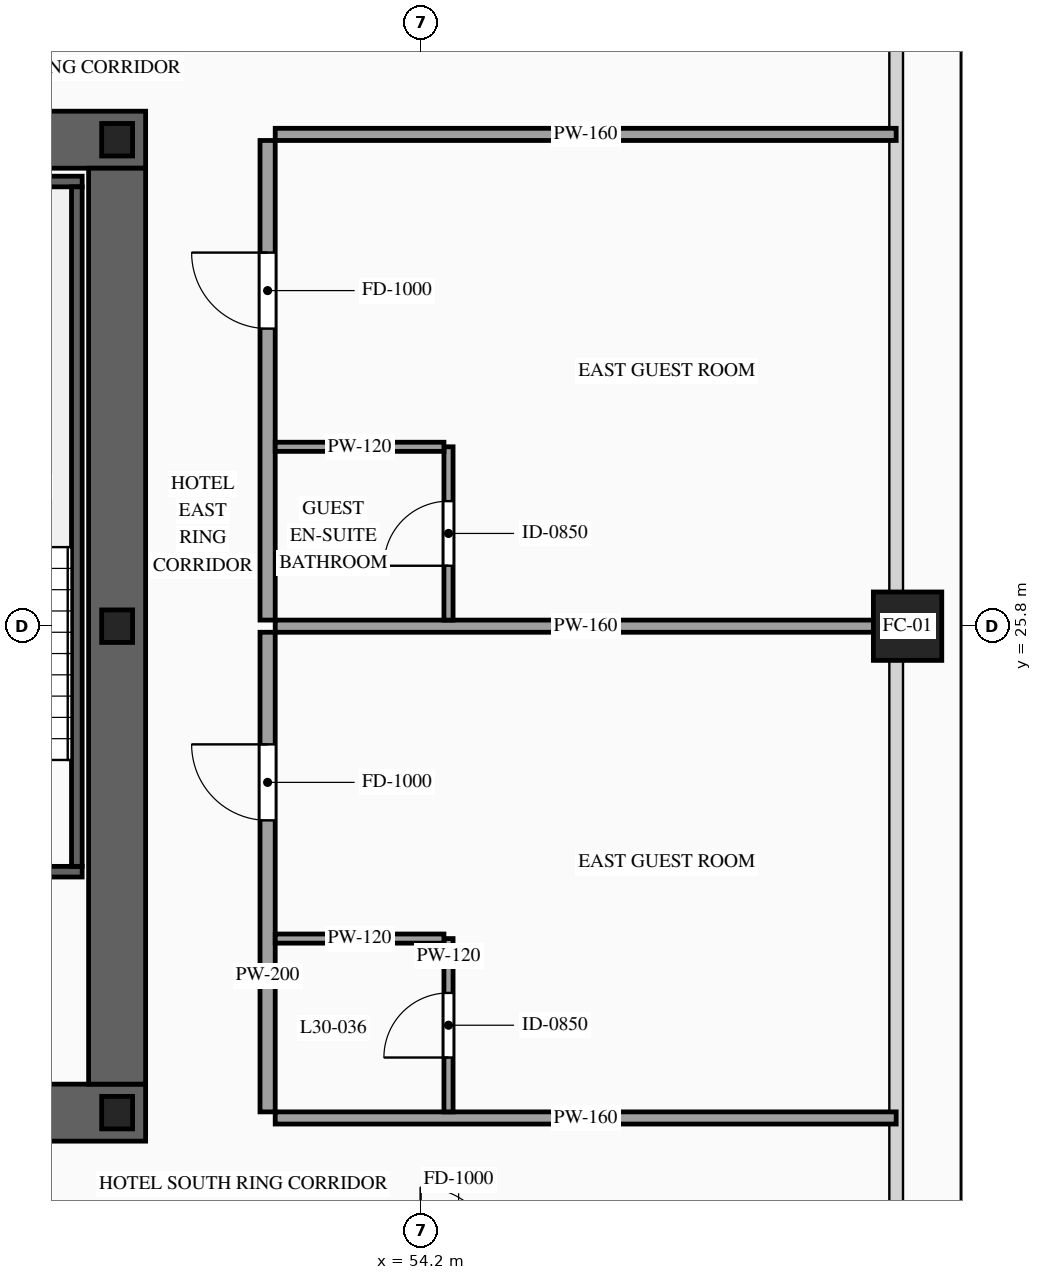
"""IFC4 building model, lengths in metres.
Left out: names, types, materials, properties, quantities, classifications, styles, units other than length and angle.
Written with IfcOpenShell. Run it as: python <this file> out.ifc"""

import sys

from ifc_helpers import new_model, si_unit, direction, frame, frame_2d, origin, origin_2d, place, context, subcontext, project, spatial, rectangle, hollow_rectangle, i_section, extrude, source, transform, mapped, element, fill, save


model = new_model("IFC4")
c1 = context("Model", 3, precision=1e-05, world=origin(), true_north=direction((0.0, 1.0)))
c2 = subcontext(c1, "Body", "Model", "MODEL_VIEW")
j1 = project(units=[si_unit("LENGTHUNIT", "METRE"), si_unit("PLANEANGLEUNIT", "RADIAN")], contexts=[c1])
p1 = place(None, origin())
s1 = spatial("IfcSite", under=j1, at=p1, CompositionType="ELEMENT")
p2 = place(p1, origin())
s2 = spatial("IfcBuilding", under=s1, at=p2, CompositionType="ELEMENT")
p3 = place(p2, frame((0.0, 0.0, 115.4)))
s3 = spatial("IfcBuildingStorey", under=s2, at=p3, CompositionType="ELEMENT", Elevation=115.4)
p4 = place(p3, frame((23.425, 19.4, 0.0), z_axis=(0.0, 0.0, 1.0), x_axis=(1.0, 0.0, 0.0)))
e1 = element("IfcWall", 1, at=p4, inside=s3, PredefinedType="SHEAR", context=c2, shape_type="SweptSolid", body=[
    extrude(rectangle(XDim=27.15, YDim=0.75, at=frame_2d((13.575, 0.0))), origin(), (0.0, 0.0, 1.0), 3.6),
])
p5 = place(p4, frame((2.025, 0.0, 0.0)))
e2 = element("IfcOpeningElement", 2, at=p5, cuts=e1, PredefinedType="OPENING", context=c2, shape_type="SweptSolid", body=[
    extrude(rectangle(XDim=1.1, YDim=2.2, at=frame_2d((0.55, 1.1))), frame((0.0, 0.39, 0.0), z_axis=(0.0, -1.0, 0.0), x_axis=(1.0, 0.0, 0.0)), (0.0, 0.0, 1.0), 0.78),
])
p6 = place(p4, frame((9.925, 0.0, 0.0)))
e3 = element("IfcOpeningElement", 3, at=p6, cuts=e1, PredefinedType="OPENING", context=c2, shape_type="SweptSolid", body=[
    extrude(rectangle(XDim=1.1, YDim=2.2, at=frame_2d((0.55, 1.1))), frame((0.0, 0.39, 0.0), z_axis=(0.0, -1.0, 0.0), x_axis=(1.0, 0.0, 0.0)), (0.0, 0.0, 1.0), 0.78),
])
p7 = place(p4, frame((23.125, 0.0, 0.0)))
e4 = element("IfcOpeningElement", 4, at=p7, cuts=e1, PredefinedType="OPENING", context=c2, shape_type="SweptSolid", body=[
    extrude(rectangle(XDim=1.1, YDim=2.2, at=frame_2d((0.55, 1.1))), frame((0.0, 0.39, 0.0), z_axis=(0.0, -1.0, 0.0), x_axis=(1.0, 0.0, 0.0)), (0.0, 0.0, 1.0), 0.78),
])
p8 = place(p4, frame((19.745, 0.0, 0.0)))
e5 = element("IfcOpeningElement", 5, at=p8, cuts=e1, PredefinedType="OPENING", context=c2, shape_type="SweptSolid", body=[
    extrude(rectangle(XDim=0.9, YDim=2.15, at=frame_2d((0.45, 1.075))), frame((0.0, 0.39, 0.0), z_axis=(0.0, -1.0, 0.0), x_axis=(1.0, 0.0, 0.0)), (0.0, 0.0, 1.0), 0.78),
])
p9 = place(p4, frame((18.305, 0.0, 0.0)))
e6 = element("IfcOpeningElement", 6, at=p9, cuts=e1, PredefinedType="OPENING", context=c2, shape_type="SweptSolid", body=[
    extrude(rectangle(XDim=0.9, YDim=2.15, at=frame_2d((0.45, 1.075))), frame((0.0, 0.39, 0.0), z_axis=(0.0, -1.0, 0.0), x_axis=(1.0, 0.0, 0.0)), (0.0, 0.0, 1.0), 0.78),
])
p10 = place(p3, frame((23.425, 32.2, 0.0), z_axis=(0.0, 0.0, 1.0), x_axis=(1.0, 0.0, 0.0)))
e7 = element("IfcWall", 7, at=p10, inside=s3, PredefinedType="SHEAR", context=c2, shape_type="SweptSolid", body=[
    extrude(rectangle(XDim=27.15, YDim=0.75, at=frame_2d((13.575, 0.0))), origin(), (0.0, 0.0, 1.0), 3.6),
])
p11 = place(p10, frame((4.645, 0.0, 0.0)))
e8 = element("IfcOpeningElement", 8, at=p11, cuts=e7, PredefinedType="OPENING", context=c2, shape_type="SweptSolid", body=[
    extrude(rectangle(XDim=0.9, YDim=2.15, at=frame_2d((0.45, 1.075))), frame((0.0, 0.39, 0.0), z_axis=(0.0, -1.0, 0.0), x_axis=(1.0, 0.0, 0.0)), (0.0, 0.0, 1.0), 0.78),
])
p12 = place(p10, frame((9.925, 0.0, 0.0)))
e9 = element("IfcOpeningElement", 9, at=p12, cuts=e7, PredefinedType="OPENING", context=c2, shape_type="SweptSolid", body=[
    extrude(rectangle(XDim=1.1, YDim=2.2, at=frame_2d((0.55, 1.1))), frame((0.0, 0.39, 0.0), z_axis=(0.0, -1.0, 0.0), x_axis=(1.0, 0.0, 0.0)), (0.0, 0.0, 1.0), 0.78),
])
p13 = place(p10, frame((15.775, 0.0, 0.0)))
e10 = element("IfcOpeningElement", 10, at=p13, cuts=e7, PredefinedType="OPENING", context=c2, shape_type="SweptSolid", body=[
    extrude(rectangle(XDim=1.1, YDim=2.2, at=frame_2d((0.55, 1.1))), frame((0.0, 0.39, 0.0), z_axis=(0.0, -1.0, 0.0), x_axis=(1.0, 0.0, 0.0)), (0.0, 0.0, 1.0), 0.78),
])
p14 = place(p10, frame((18.305, 0.0, 0.0)))
e11 = element("IfcOpeningElement", 11, at=p14, cuts=e7, PredefinedType="OPENING", context=c2, shape_type="SweptSolid", body=[
    extrude(rectangle(XDim=0.9, YDim=2.15, at=frame_2d((0.45, 1.075))), frame((0.0, 0.39, 0.0), z_axis=(0.0, -1.0, 0.0), x_axis=(1.0, 0.0, 0.0)), (0.0, 0.0, 1.0), 0.78),
])
p15 = place(p10, frame((19.745, 0.0, 0.0)))
e12 = element("IfcOpeningElement", 12, at=p15, cuts=e7, PredefinedType="OPENING", context=c2, shape_type="SweptSolid", body=[
    extrude(rectangle(XDim=0.9, YDim=2.15, at=frame_2d((0.45, 1.075))), frame((0.0, 0.39, 0.0), z_axis=(0.0, -1.0, 0.0), x_axis=(1.0, 0.0, 0.0)), (0.0, 0.0, 1.0), 0.78),
])
m1 = source(origin(), c2, "Body", "SweptSolid", [
    extrude(rectangle(XDim=12.05, YDim=0.75, at=frame_2d((6.025, 0.0))), origin(), (0.0, 0.0, 1.0), 3.6),
])
p16 = place(p3, frame((50.2, 19.775, 0.0), z_axis=(0.0, 0.0, 1.0), x_axis=(0.0, 1.0, 0.0)))
e13 = element("IfcWall", 13, at=p16, inside=s3, PredefinedType="SHEAR", context=c2, shape_type="MappedRepresentation", body=[
    mapped(m1, transform((0.0, 0.0, 0.0), scale=1.0)),
])
m2 = source(origin(), c2, "Body", "SweptSolid", [
    extrude(i_section(OverallWidth=0.407, OverallDepth=0.428, WebThickness=0.02, FlangeThickness=0.035, at=origin_2d()), origin(), (0.0, 0.0, 1.0), 3.6),
])
for number, where, z_axis, x_axis in (
    (14, (50.2, 19.4, 0.0), (0.0, 0.0, 1.0), (1.0, 0.0, 0.0)),
    (15, (50.2, 25.8, 0.0), (0.0, 0.0, 1.0), (1.0, 0.0, 0.0)),
    (16, (50.2, 32.2, 0.0), (0.0, 0.0, 1.0), (1.0, 0.0, 0.0)),
):
    element("IfcColumn", number, at=place(p3, frame(where, z_axis=z_axis, x_axis=x_axis)), inside=s3, PredefinedType="COLUMN", context=c2, shape_type="MappedRepresentation", body=[
        mapped(m2, transform((0.0, 0.0, 0.0), scale=1.0)),
    ])
m3 = source(origin(), c2, "Body", "SweptSolid", [
    extrude(hollow_rectangle(XDim=0.9, YDim=0.9, WallThickness=0.042, at=origin_2d()), origin(), (0.0, 0.0, 1.0), 3.6),
])
p17 = place(p3, frame((60.6, 25.8, 0.0), z_axis=(0.0, 0.0, 1.0), x_axis=(1.0, 0.0, 0.0)))
e17 = element("IfcColumn", 17, at=p17, inside=s3, PredefinedType="COLUMN", context=c2, shape_type="MappedRepresentation", body=[
    mapped(m3, transform((0.0, 0.0, 0.0), scale=1.0)),
])
p18 = place(p3, frame((46.46, 22.57, 0.0), z_axis=(0.0, 0.0, 1.0), x_axis=(1.0, 0.0, 0.0)))
e18 = element("IfcWall", 18, at=p18, inside=s3, PredefinedType="SOLIDWALL", context=c2, shape_type="SweptSolid", body=[
    extrude(rectangle(XDim=3.28, YDim=0.14, at=frame_2d((1.64, 0.0))), origin(), (0.0, 0.0, 1.0), 3.38),
])
p19 = place(p18, frame((1.09, 0.0, 0.0)))
e19 = element("IfcOpeningElement", 19, at=p19, cuts=e18, PredefinedType="OPENING", context=c2, shape_type="SweptSolid", body=[
    extrude(rectangle(XDim=1.1, YDim=2.2, at=frame_2d((0.55, 1.1))), frame((0.0, 0.085, 0.0), z_axis=(0.0, -1.0, 0.0), x_axis=(1.0, 0.0, 0.0)), (0.0, 0.0, 1.0), 0.17),
])
m4 = source(origin(), c2, "Body", "SweptSolid", [
    extrude(rectangle(XDim=3.28, YDim=0.14, at=frame_2d((1.64, 0.0))), origin(), (0.0, 0.0, 1.0), 3.38),
])
p20 = place(p3, frame((46.46, 31.65, 0.0), z_axis=(0.0, 0.0, 1.0), x_axis=(1.0, 0.0, 0.0)))
e20 = element("IfcWall", 20, at=p20, inside=s3, PredefinedType="SOLIDWALL", context=c2, shape_type="MappedRepresentation", body=[
    mapped(m4, transform((0.0, 0.0, 0.0), scale=1.0)),
])
m5 = source(origin(), c2, "Body", "SweptSolid", [
    extrude(rectangle(XDim=8.94, YDim=0.14, at=frame_2d((4.47, 0.0))), origin(), (0.0, 0.0, 1.0), 3.38),
])
p21 = place(p3, frame((49.67, 22.64, 0.0), z_axis=(0.0, 0.0, 1.0), x_axis=(0.0, 1.0, 0.0)))
e21 = element("IfcWall", 21, at=p21, inside=s3, PredefinedType="SOLIDWALL", context=c2, shape_type="MappedRepresentation", body=[
    mapped(m5, transform((0.0, 0.0, 0.0), scale=1.0)),
])
p22 = place(p3, frame((52.18, 19.41, 0.0), z_axis=(0.0, 0.0, 1.0), x_axis=(0.0, 1.0, 0.0)))
e22 = element("IfcWall", 22, at=p22, inside=s3, PredefinedType="PARTITIONING", context=c2, shape_type="SweptSolid", body=[
    extrude(rectangle(XDim=6.31, YDim=0.2, at=frame_2d((3.155, 0.0))), origin(), (0.0, 0.0, 1.0), 3.38),
])
p23 = place(p22, frame((3.835, 0.0, 0.0)))
e23 = element("IfcOpeningElement", 23, at=p23, cuts=e22, PredefinedType="OPENING", context=c2, shape_type="SweptSolid", body=[
    extrude(rectangle(XDim=1.0, YDim=2.2, at=frame_2d((0.5, 1.1))), frame((0.0, 0.115, 0.0), z_axis=(0.0, -1.0, 0.0), x_axis=(1.0, 0.0, 0.0)), (0.0, 0.0, 1.0), 0.23),
])
m6 = source(origin(), c2, "Body", "SweptSolid", [
    extrude(rectangle(XDim=8.17, YDim=0.16, at=frame_2d((4.085, 0.0))), origin(), (0.0, 0.0, 1.0), 2.675),
])
p24 = place(p3, frame((52.28, 25.8, 0.0), z_axis=(0.0, 0.0, 1.0), x_axis=(1.0, 0.0, 0.0)))
e24 = element("IfcWall", 24, at=p24, inside=s3, PredefinedType="PARTITIONING", context=c2, shape_type="MappedRepresentation", body=[
    mapped(m6, transform((0.0, 0.0, 0.0), scale=1.0)),
])
m7 = source(origin(), c2, "Body", "SweptSolid", [
    extrude(rectangle(XDim=8.17, YDim=0.16, at=frame_2d((4.085, 0.0))), origin(), (0.0, 0.0, 1.0), 2.875),
])
p25 = place(p3, frame((52.28, 19.33, 0.0), z_axis=(0.0, 0.0, 1.0), x_axis=(1.0, 0.0, 0.0)))
e25 = element("IfcWall", 25, at=p25, inside=s3, PredefinedType="PARTITIONING", context=c2, shape_type="MappedRepresentation", body=[
    mapped(m7, transform((0.0, 0.0, 0.0), scale=1.0)),
])
p26 = place(p3, frame((54.56, 19.41, 0.0), z_axis=(0.0, 0.0, 1.0), x_axis=(0.0, 1.0, 0.0)))
e26 = element("IfcWall", 26, at=p26, inside=s3, PredefinedType="PARTITIONING", context=c2, shape_type="SweptSolid", body=[
    extrude(rectangle(XDim=2.28, YDim=0.12, at=frame_2d((1.14, 0.0))), origin(), (0.0, 0.0, 1.0), 3.38),
])
p27 = place(p26, frame((0.715, 0.0, 0.0)))
e27 = element("IfcOpeningElement", 27, at=p27, cuts=e26, PredefinedType="OPENING", context=c2, shape_type="SweptSolid", body=[
    extrude(rectangle(XDim=0.85, YDim=2.1, at=frame_2d((0.425, 1.05))), frame((0.0, 0.075, 0.0), z_axis=(0.0, -1.0, 0.0), x_axis=(1.0, 0.0, 0.0)), (0.0, 0.0, 1.0), 0.15),
])
m8 = source(origin(), c2, "Body", "SweptSolid", [
    extrude(rectangle(XDim=2.22, YDim=0.12, at=frame_2d((1.11, 0.0))), origin(), (0.0, 0.0, 1.0), 3.38),
])
p28 = place(p3, frame((52.28, 21.69, 0.0), z_axis=(0.0, 0.0, 1.0), x_axis=(1.0, 0.0, 0.0)))
e28 = element("IfcWall", 28, at=p28, inside=s3, PredefinedType="PARTITIONING", context=c2, shape_type="MappedRepresentation", body=[
    mapped(m8, transform((0.0, 0.0, 0.0), scale=1.0)),
])
p29 = place(p3, frame((52.18, 25.88, 0.0), z_axis=(0.0, 0.0, 1.0), x_axis=(0.0, 1.0, 0.0)))
e29 = element("IfcWall", 29, at=p29, inside=s3, PredefinedType="PARTITIONING", context=c2, shape_type="SweptSolid", body=[
    extrude(rectangle(XDim=6.31, YDim=0.2, at=frame_2d((3.155, 0.0))), origin(), (0.0, 0.0, 1.0), 3.38),
])
p30 = place(p29, frame((3.835, 0.0, 0.0)))
e30 = element("IfcOpeningElement", 30, at=p30, cuts=e29, PredefinedType="OPENING", context=c2, shape_type="SweptSolid", body=[
    extrude(rectangle(XDim=1.0, YDim=2.2, at=frame_2d((0.5, 1.1))), frame((0.0, 0.115, 0.0), z_axis=(0.0, -1.0, 0.0), x_axis=(1.0, 0.0, 0.0)), (0.0, 0.0, 1.0), 0.23),
])
p31 = place(p3, frame((52.28, 32.27, 0.0), z_axis=(0.0, 0.0, 1.0), x_axis=(1.0, 0.0, 0.0)))
e31 = element("IfcWall", 31, at=p31, inside=s3, PredefinedType="PARTITIONING", context=c2, shape_type="MappedRepresentation", body=[
    mapped(m7, transform((0.0, 0.0, 0.0), scale=1.0)),
])
p32 = place(p3, frame((54.56, 25.88, 0.0), z_axis=(0.0, 0.0, 1.0), x_axis=(0.0, 1.0, 0.0)))
e32 = element("IfcWall", 32, at=p32, inside=s3, PredefinedType="PARTITIONING", context=c2, shape_type="SweptSolid", body=[
    extrude(rectangle(XDim=2.28, YDim=0.12, at=frame_2d((1.14, 0.0))), origin(), (0.0, 0.0, 1.0), 3.38),
])
p33 = place(p32, frame((0.715, 0.0, 0.0)))
e33 = element("IfcOpeningElement", 33, at=p33, cuts=e32, PredefinedType="OPENING", context=c2, shape_type="SweptSolid", body=[
    extrude(rectangle(XDim=0.85, YDim=2.1, at=frame_2d((0.425, 1.05))), frame((0.0, 0.075, 0.0), z_axis=(0.0, -1.0, 0.0), x_axis=(1.0, 0.0, 0.0)), (0.0, 0.0, 1.0), 0.15),
])
p34 = place(p3, frame((52.28, 28.16, 0.0), z_axis=(0.0, 0.0, 1.0), x_axis=(1.0, 0.0, 0.0)))
e34 = element("IfcWall", 34, at=p34, inside=s3, PredefinedType="PARTITIONING", context=c2, shape_type="MappedRepresentation", body=[
    mapped(m8, transform((0.0, 0.0, 0.0), scale=1.0)),
])
m9 = source(origin(), c2, "Body", "SweptSolid", [
    extrude(rectangle(XDim=1.0, YDim=2.2, at=frame_2d((0.5, 1.1))), frame((0.0, 0.025, 0.0), z_axis=(0.0, -1.0, 0.0), x_axis=(1.0, 0.0, 0.0)), (0.0, 0.0, 1.0), 0.05),
])
p35 = place(p23, origin())
e35 = element("IfcDoor", 35, at=p35, inside=s3, OperationType="SINGLE_SWING_RIGHT", PredefinedType="DOOR", context=c2, shape_type="MappedRepresentation", body=[
    mapped(m9, transform((0.0, 0.0, 0.0), scale=1.0)),
])
fill(e23, e35)
m10 = source(origin(), c2, "Body", "SweptSolid", [
    extrude(rectangle(XDim=0.85, YDim=2.1, at=frame_2d((0.425, 1.05))), frame((0.0, 0.025, 0.0), z_axis=(0.0, -1.0, 0.0), x_axis=(1.0, 0.0, 0.0)), (0.0, 0.0, 1.0), 0.05),
])
p36 = place(p27, origin())
e36 = element("IfcDoor", 36, at=p36, inside=s3, OperationType="SINGLE_SWING_LEFT", PredefinedType="DOOR", context=c2, shape_type="MappedRepresentation", body=[
    mapped(m10, transform((0.0, 0.0, 0.0), scale=1.0)),
])
fill(e27, e36)
p37 = place(p30, origin())
e37 = element("IfcDoor", 37, at=p37, inside=s3, OperationType="SINGLE_SWING_RIGHT", PredefinedType="DOOR", context=c2, shape_type="MappedRepresentation", body=[
    mapped(m9, transform((0.0, 0.0, 0.0), scale=1.0)),
])
fill(e30, e37)
p38 = place(p33, origin())
e38 = element("IfcDoor", 38, at=p38, inside=s3, OperationType="SINGLE_SWING_LEFT", PredefinedType="DOOR", context=c2, shape_type="MappedRepresentation", body=[
    mapped(m10, transform((0.0, 0.0, 0.0), scale=1.0)),
])
fill(e33, e38)
save(model, sys.argv[1])
